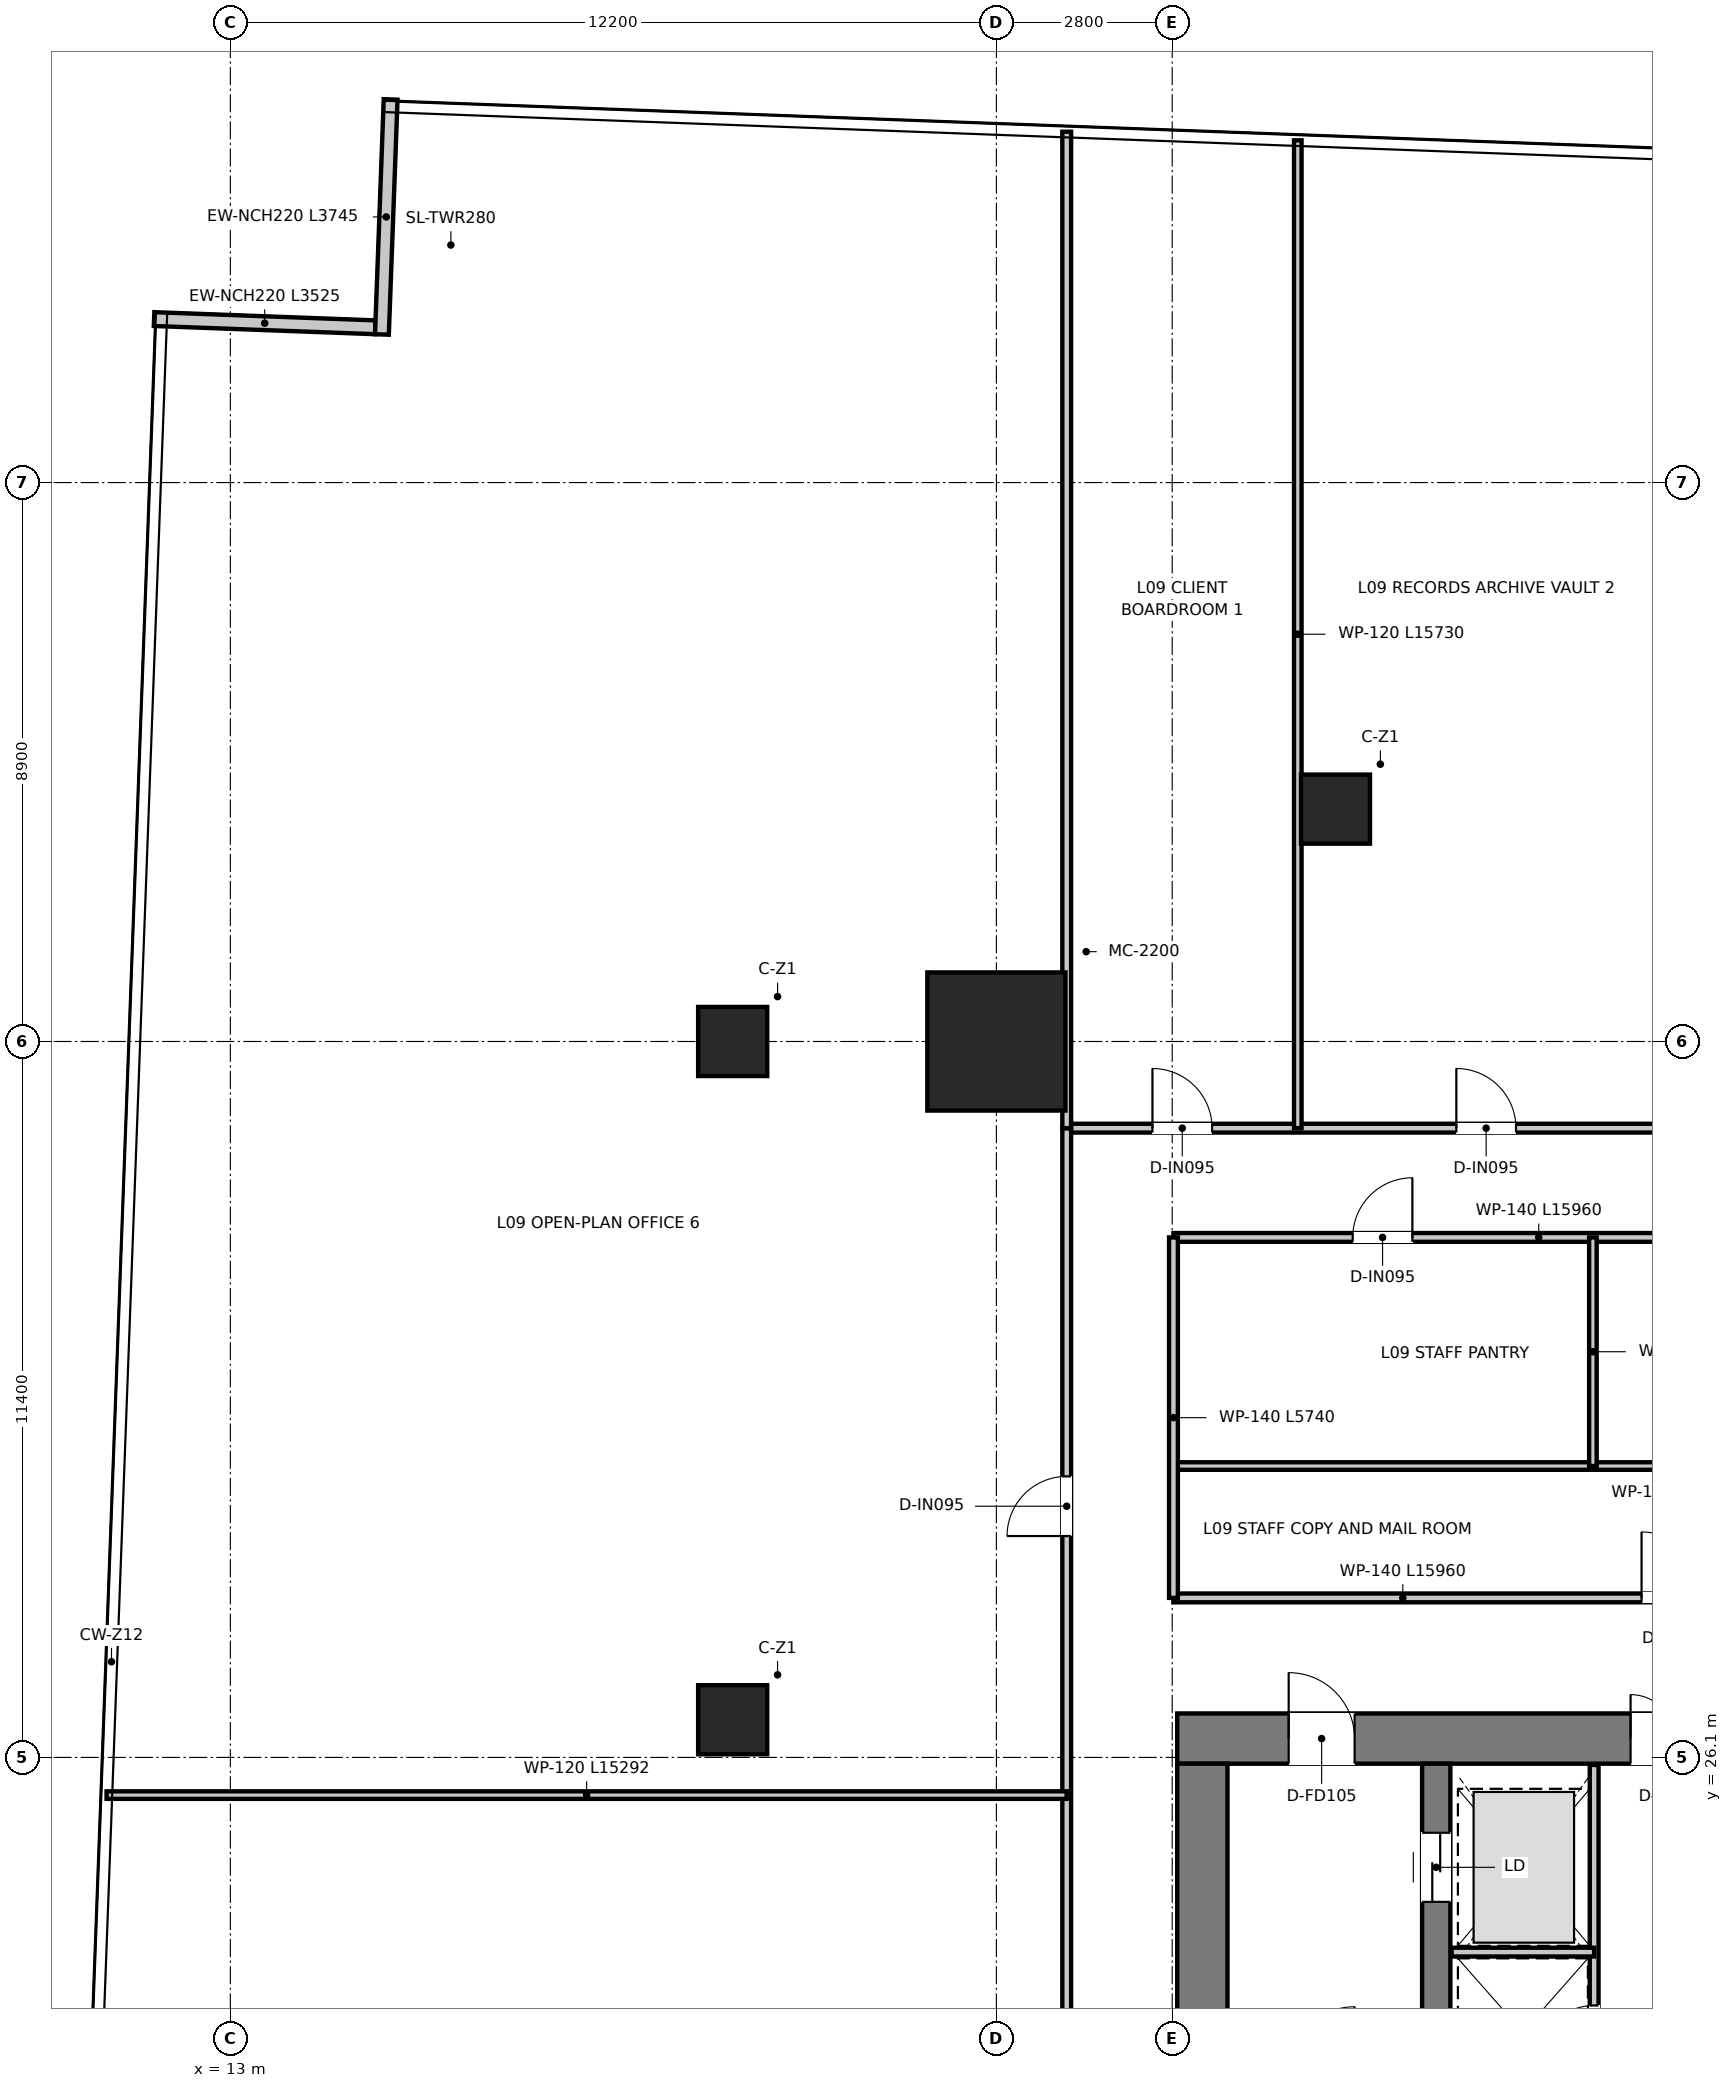
"""IFC4 building model, lengths in metres.
Left out: names, types, materials, properties, quantities, classifications, styles, units other than length and angle.
Written with IfcOpenShell. Run it as: python <this file> out.ifc"""

import sys

from ifc_helpers import new_model, si_unit, direction, frame, frame_2d, origin, origin_2d, place, context, subcontext, project, spatial, rectangle, extrude, source, transform, mapped, element, fill, save


model = new_model("IFC4")
c1 = context("Model", 3, precision=1e-05, world=origin(), true_north=direction((0.0, 1.0)))
c2 = subcontext(c1, "Body", "Model", "MODEL_VIEW")
j1 = project(units=[si_unit("LENGTHUNIT", "METRE"), si_unit("PLANEANGLEUNIT", "RADIAN")], contexts=[c1])
p1 = place(None, origin())
s1 = spatial("IfcSite", under=j1, at=p1, CompositionType="ELEMENT")
p2 = place(p1, origin())
s2 = spatial("IfcBuilding", under=s1, at=p2, CompositionType="ELEMENT")
p3 = place(p2, frame((0.0, 0.0, 40.8)))
s3 = spatial("IfcBuildingStorey", under=s2, at=p3, CompositionType="ELEMENT", Elevation=40.8)
p4 = place(p3, frame((28.08, 26.4, 0.0), z_axis=(0.0, 0.0, 1.0), x_axis=(1.0, 0.0, 0.0)))
e1 = element("IfcWall", 1, at=p4, inside=s3, PredefinedType="SHEAR", context=c2, shape_type="SweptSolid", body=[
    extrude(rectangle(XDim=15.84, YDim=0.8, at=frame_2d((7.92, 0.0))), origin(), (0.0, 0.0, 1.0), 3.95),
])
p5 = place(p4, frame((7.22, 0.0, 0.0)))
e2 = element("IfcOpeningElement", 2, at=p5, cuts=e1, PredefinedType="OPENING", context=c2, shape_type="SweptSolid", body=[
    extrude(rectangle(XDim=1.4, YDim=2.2, at=frame_2d((0.7, 1.1))), frame((0.0, 0.41, 0.0), z_axis=(0.0, -1.0, 0.0), x_axis=(1.0, 0.0, 0.0)), (0.0, 0.0, 1.0), 0.82),
])
p6 = place(p4, frame((1.775, 0.0, 0.0)))
e3 = element("IfcOpeningElement", 3, at=p6, cuts=e1, PredefinedType="OPENING", context=c2, shape_type="SweptSolid", body=[
    extrude(rectangle(XDim=1.05, YDim=2.1, at=frame_2d((0.525, 1.05))), frame((0.0, 0.41, 0.0), z_axis=(0.0, -1.0, 0.0), x_axis=(1.0, 0.0, 0.0)), (0.0, 0.0, 1.0), 0.82),
])
p7 = place(p4, frame((13.015, 0.0, 0.0)))
e4 = element("IfcOpeningElement", 4, at=p7, cuts=e1, PredefinedType="OPENING", context=c2, shape_type="SweptSolid", body=[
    extrude(rectangle(XDim=1.05, YDim=2.1, at=frame_2d((0.525, 1.05))), frame((0.0, 0.41, 0.0), z_axis=(0.0, -1.0, 0.0), x_axis=(1.0, 0.0, 0.0)), (0.0, 0.0, 1.0), 0.82),
])
p8 = place(p3, frame((28.48, 11.3, 0.0), z_axis=(0.0, 0.0, 1.0), x_axis=(0.0, 1.0, 0.0)))
e5 = element("IfcWall", 5, at=p8, inside=s3, PredefinedType="SHEAR", context=c2, shape_type="SweptSolid", body=[
    extrude(rectangle(XDim=14.7, YDim=0.8, at=frame_2d((7.35, 0.0))), origin(), (0.0, 0.0, 1.0), 3.95),
])
p9 = place(p3, frame((32.205, 13.22, 0.0), z_axis=(0.0, 0.0, 1.0), x_axis=(0.0, 1.0, 0.0)))
e6 = element("IfcWall", 6, at=p9, inside=s3, PredefinedType="SHEAR", context=c2, shape_type="SweptSolid", body=[
    extrude(rectangle(XDim=12.78, YDim=0.45, at=frame_2d((6.39, 0.0))), origin(), (0.0, 0.0, 1.0), 3.95),
])
p10 = place(p9, frame((10.58, 0.0, 0.0)))
e7 = element("IfcOpeningElement", 7, at=p10, cuts=e6, PredefinedType="OPENING", context=c2, shape_type="SweptSolid", body=[
    extrude(rectangle(XDim=1.1, YDim=2.15, at=frame_2d((0.55, 1.075))), frame((0.0, 0.235, 0.0), z_axis=(0.0, -1.0, 0.0), x_axis=(1.0, 0.0, 0.0)), (0.0, 0.0, 1.0), 0.47),
])
m1 = source(origin(), c2, "Body", "SweptSolid", [
    extrude(rectangle(XDim=2.2, YDim=2.2, at=origin_2d()), origin(), (0.0, 0.0, 1.0), 3.95),
])
p11 = place(p3, frame((25.2, 37.5, 0.0), z_axis=(0.0, 0.0, 1.0), x_axis=(1.0, 0.0, 0.0)))
e8 = element("IfcColumn", 8, at=p11, inside=s3, PredefinedType="USERDEFINED", context=c2, shape_type="MappedRepresentation", body=[
    mapped(m1, transform((0.0, 0.0, 0.0), x_axis=(1.0, 0.0, 0.0), y_axis=(0.0, 1.0, 0.0), z_axis=(0.0, 0.0, 1.0), scale=1.0)),
])
m2 = source(origin(), c2, "Body", "SweptSolid", [
    extrude(rectangle(XDim=1.1, YDim=1.1, at=origin_2d()), origin(), (0.0, 0.0, 1.0), 3.95),
])
for number, where, z_axis, x_axis in (
    (9, (21.0, 26.7, 0.0), (0.0, 0.0, 1.0), (1.0, 0.0, 0.0)),
    (10, (21.0, 37.5, 0.0), (0.0, 0.0, 1.0), (1.0, 0.0, 0.0)),
    (11, (30.6, 41.2, 0.0), (0.0, 0.0, 1.0), (1.0, 0.0, 0.0)),
):
    element("IfcColumn", number, at=place(p3, frame(where, z_axis=z_axis, x_axis=x_axis)), inside=s3, PredefinedType="COLUMN", context=c2, shape_type="MappedRepresentation", body=[
        mapped(m2, transform((0.0, 0.0, 0.0), x_axis=(1.0, 0.0, 0.0), y_axis=(0.0, 1.0, 0.0), z_axis=(0.0, 0.0, 1.0), scale=1.0)),
    ])
p12 = place(p3, frame((15.308, 48.873, 0.0), z_axis=(0.0, 0.0, 1.0), x_axis=(-0.999313219865, 0.03705521019, 0.0)))
e12 = element("IfcWall", 12, at=p12, inside=s3, PredefinedType="ELEMENTEDWALL", context=c2, shape_type="SweptSolid", body=[
    extrude(rectangle(XDim=3.525, YDim=0.22, at=frame_2d((1.762, 0.0))), origin(), (0.0, 0.0, 1.0), 3.67),
])
p13 = place(p3, frame((15.553, 52.501, 0.0), z_axis=(0.0, 0.0, 1.0), x_axis=(-0.037093640215, -0.999311794114, 0.0)))
e13 = element("IfcWall", 13, at=p13, inside=s3, PredefinedType="ELEMENTEDWALL", context=c2, shape_type="SweptSolid", body=[
    extrude(rectangle(XDim=3.745, YDim=0.22, at=frame_2d((1.873, 0.0))), origin(), (0.0, 0.0, 1.0), 3.67),
])
p14 = place(p3, frame((34.72, 20.2, 0.0), z_axis=(0.0, 0.0, 1.0), x_axis=(0.0, 1.0, 0.0)))
e14 = element("IfcWall", 14, at=p14, inside=s3, PredefinedType="PARTITIONING", context=c2, shape_type="SweptSolid", body=[
    extrude(rectangle(XDim=5.78, YDim=0.14, at=frame_2d((2.89, 0.0))), origin(), (0.0, 0.0, 1.0), 2.47),
])
p15 = place(p14, frame((1.05, 0.0, 0.0)))
e15 = element("IfcOpeningElement", 15, at=p15, cuts=e14, PredefinedType="OPENING", context=c2, shape_type="SweptSolid", body=[
    extrude(rectangle(XDim=0.9, YDim=2.1, at=frame_2d((0.45, 1.05))), frame((0.0, 0.08, 0.0), z_axis=(0.0, -1.0, 0.0), x_axis=(1.0, 0.0, 0.0)), (0.0, 0.0, 1.0), 0.16),
])
p16 = place(p3, frame((32.45, 23.0, 0.0), z_axis=(0.0, 0.0, 1.0), x_axis=(1.0, 0.0, 0.0)))
e16 = element("IfcWall", 16, at=p16, inside=s3, PredefinedType="PARTITIONING", context=c2, shape_type="SweptSolid", body=[
    extrude(rectangle(XDim=2.27, YDim=0.14, at=frame_2d((1.135, 0.0))), origin(), (0.0, 0.0, 1.0), 2.47),
])
p17 = place(p3, frame((28.02, 28.64, 0.0), z_axis=(0.0, 0.0, 1.0), x_axis=(1.0, 0.0, 0.0)))
e17 = element("IfcWall", 17, at=p17, inside=s3, PredefinedType="PARTITIONING", context=c2, shape_type="SweptSolid", body=[
    extrude(rectangle(XDim=15.96, YDim=0.14, at=frame_2d((7.98, 0.0))), origin(), (0.0, 0.0, 1.0), 3.08),
])
p18 = place(p17, frame((7.455, 0.0, 0.0)))
e18 = element("IfcOpeningElement", 18, at=p18, cuts=e17, PredefinedType="OPENING", context=c2, shape_type="SweptSolid", body=[
    extrude(rectangle(XDim=1.05, YDim=2.15, at=frame_2d((0.525, 1.075))), frame((0.0, 0.08, 0.0), z_axis=(0.0, -1.0, 0.0), x_axis=(1.0, 0.0, 0.0)), (0.0, 0.0, 1.0), 0.16),
])
p19 = place(p3, frame((28.02, 30.74, 0.0), z_axis=(0.0, 0.0, 1.0), x_axis=(1.0, 0.0, 0.0)))
e19 = element("IfcWall", 19, at=p19, inside=s3, PredefinedType="PARTITIONING", context=c2, shape_type="SweptSolid", body=[
    extrude(rectangle(XDim=15.96, YDim=0.12, at=frame_2d((7.98, 0.0))), origin(), (0.0, 0.0, 1.0), 3.08),
])
p20 = place(p3, frame((28.02, 34.38, 0.0), z_axis=(0.0, 0.0, 1.0), x_axis=(1.0, 0.0, 0.0)))
e20 = element("IfcWall", 20, at=p20, inside=s3, PredefinedType="PARTITIONING", context=c2, shape_type="SweptSolid", body=[
    extrude(rectangle(XDim=15.96, YDim=0.14, at=frame_2d((7.98, 0.0))), origin(), (0.0, 0.0, 1.0), 3.08),
])
p21 = place(p20, frame((7.83, 0.0, 0.0)))
e21 = element("IfcOpeningElement", 21, at=p21, cuts=e20, PredefinedType="OPENING", context=c2, shape_type="SweptSolid", body=[
    extrude(rectangle(XDim=0.9, YDim=2.1, at=frame_2d((0.45, 1.05))), frame((0.0, 0.08, 0.0), z_axis=(0.0, -1.0, 0.0), x_axis=(1.0, 0.0, 0.0)), (0.0, 0.0, 1.0), 0.16),
])
p22 = place(p20, frame((11.03, 0.0, 0.0)))
e22 = element("IfcOpeningElement", 22, at=p22, cuts=e20, PredefinedType="OPENING", context=c2, shape_type="SweptSolid", body=[
    extrude(rectangle(XDim=0.9, YDim=2.1, at=frame_2d((0.45, 1.05))), frame((0.0, 0.08, 0.0), z_axis=(0.0, -1.0, 0.0), x_axis=(1.0, 0.0, 0.0)), (0.0, 0.0, 1.0), 0.16),
])
p23 = place(p20, frame((14.055, 0.0, 0.0)))
e23 = element("IfcOpeningElement", 23, at=p23, cuts=e20, PredefinedType="OPENING", context=c2, shape_type="SweptSolid", body=[
    extrude(rectangle(XDim=0.95, YDim=2.1, at=frame_2d((0.475, 1.05))), frame((0.0, 0.08, 0.0), z_axis=(0.0, -1.0, 0.0), x_axis=(1.0, 0.0, 0.0)), (0.0, 0.0, 1.0), 0.16),
])
p24 = place(p20, frame((2.855, 0.0, 0.0)))
e24 = element("IfcOpeningElement", 24, at=p24, cuts=e20, PredefinedType="OPENING", context=c2, shape_type="SweptSolid", body=[
    extrude(rectangle(XDim=0.95, YDim=2.1, at=frame_2d((0.475, 1.05))), frame((0.0, 0.08, 0.0), z_axis=(0.0, -1.0, 0.0), x_axis=(1.0, 0.0, 0.0)), (0.0, 0.0, 1.0), 0.16),
])
p25 = place(p3, frame((28.02, 28.64, 0.0), z_axis=(0.0, 0.0, 1.0), x_axis=(0.0, 1.0, 0.0)))
e25 = element("IfcWall", 25, at=p25, inside=s3, PredefinedType="PARTITIONING", context=c2, shape_type="SweptSolid", body=[
    extrude(rectangle(XDim=5.74, YDim=0.14, at=frame_2d((2.87, 0.0))), origin(), (0.0, 0.0, 1.0), 3.22),
])
p26 = place(p3, frame((34.7, 30.74, 0.0), z_axis=(0.0, 0.0, 1.0), x_axis=(0.0, 1.0, 0.0)))
e26 = element("IfcWall", 26, at=p26, inside=s3, PredefinedType="PARTITIONING", context=c2, shape_type="SweptSolid", body=[
    extrude(rectangle(XDim=3.64, YDim=0.12, at=frame_2d((1.82, 0.0))), origin(), (0.0, 0.0, 1.0), 3.12),
])
p27 = place(p3, frame((26.32, 36.12, 0.0), z_axis=(0.0, 0.0, 1.0), x_axis=(1.0, 0.0, 0.0)))
e27 = element("IfcWall", 27, at=p27, inside=s3, PredefinedType="PARTITIONING", context=c2, shape_type="SweptSolid", body=[
    extrude(rectangle(XDim=19.36, YDim=0.14, at=frame_2d((9.68, 0.0))), origin(), (0.0, 0.0, 1.0), 3.08),
])
p28 = place(p27, frame((1.365, 0.0, 0.0)))
e28 = element("IfcOpeningElement", 28, at=p28, cuts=e27, PredefinedType="OPENING", context=c2, shape_type="SweptSolid", body=[
    extrude(rectangle(XDim=0.95, YDim=2.1, at=frame_2d((0.475, 1.05))), frame((0.0, 0.08, 0.0), z_axis=(0.0, -1.0, 0.0), x_axis=(1.0, 0.0, 0.0)), (0.0, 0.0, 1.0), 0.16),
])
p29 = place(p27, frame((6.205, 0.0, 0.0)))
e29 = element("IfcOpeningElement", 29, at=p29, cuts=e27, PredefinedType="OPENING", context=c2, shape_type="SweptSolid", body=[
    extrude(rectangle(XDim=0.95, YDim=2.1, at=frame_2d((0.475, 1.05))), frame((0.0, 0.08, 0.0), z_axis=(0.0, -1.0, 0.0), x_axis=(1.0, 0.0, 0.0)), (0.0, 0.0, 1.0), 0.16),
])
p30 = place(p27, frame((12.205, 0.0, 0.0)))
e30 = element("IfcOpeningElement", 30, at=p30, cuts=e27, PredefinedType="OPENING", context=c2, shape_type="SweptSolid", body=[
    extrude(rectangle(XDim=0.95, YDim=2.1, at=frame_2d((0.475, 1.05))), frame((0.0, 0.08, 0.0), z_axis=(0.0, -1.0, 0.0), x_axis=(1.0, 0.0, 0.0)), (0.0, 0.0, 1.0), 0.16),
])
p31 = place(p27, frame((17.045, 0.0, 0.0)))
e31 = element("IfcOpeningElement", 31, at=p31, cuts=e27, PredefinedType="OPENING", context=c2, shape_type="SweptSolid", body=[
    extrude(rectangle(XDim=0.95, YDim=2.1, at=frame_2d((0.475, 1.05))), frame((0.0, 0.08, 0.0), z_axis=(0.0, -1.0, 0.0), x_axis=(1.0, 0.0, 0.0)), (0.0, 0.0, 1.0), 0.16),
])
p32 = place(p3, frame((26.32, 10.5, 0.0), z_axis=(0.0, 0.0, 1.0), x_axis=(0.0, 1.0, 0.0)))
e32 = element("IfcWall", 32, at=p32, inside=s3, PredefinedType="PARTITIONING", context=c2, shape_type="SweptSolid", body=[
    extrude(rectangle(XDim=25.62, YDim=0.14, at=frame_2d((12.81, 0.0))), origin(), (0.0, 0.0, 1.0), 2.97),
])
p33 = place(p32, frame((10.525, 0.0, 0.0)))
e33 = element("IfcOpeningElement", 33, at=p33, cuts=e32, PredefinedType="OPENING", context=c2, shape_type="SweptSolid", body=[
    extrude(rectangle(XDim=0.95, YDim=2.1, at=frame_2d((0.475, 1.05))), frame((0.0, 0.08, 0.0), z_axis=(0.0, -1.0, 0.0), x_axis=(1.0, 0.0, 0.0)), (0.0, 0.0, 1.0), 0.16),
])
p34 = place(p32, frame((19.125, 0.0, 0.0)))
e34 = element("IfcOpeningElement", 34, at=p34, cuts=e32, PredefinedType="OPENING", context=c2, shape_type="SweptSolid", body=[
    extrude(rectangle(XDim=0.95, YDim=2.1, at=frame_2d((0.475, 1.05))), frame((0.0, 0.08, 0.0), z_axis=(0.0, -1.0, 0.0), x_axis=(1.0, 0.0, 0.0)), (0.0, 0.0, 1.0), 0.16),
])
p35 = place(p3, frame((26.32, 36.12, 0.0), z_axis=(0.0, 0.0, 1.0), x_axis=(0.0, 1.0, 0.0)))
e35 = element("IfcWall", 35, at=p35, inside=s3, PredefinedType="PARTITIONING", context=c2, shape_type="SweptSolid", body=[
    extrude(rectangle(XDim=15.866, YDim=0.14, at=frame_2d((7.933, 0.0))), origin(), (0.0, 0.0, 1.0), 2.97),
])
p36 = place(p3, frame((30.0, 36.12, 0.0), z_axis=(0.0, 0.0, 1.0), x_axis=(0.0, 1.0, 0.0)))
e36 = element("IfcWall", 36, at=p36, inside=s3, PredefinedType="PARTITIONING", context=c2, shape_type="SweptSolid", body=[
    extrude(rectangle(XDim=15.73, YDim=0.12, at=frame_2d((7.865, 0.0))), origin(), (0.0, 0.0, 1.0), 2.97),
])
p37 = place(p3, frame((11.028, 25.5, 0.0), z_axis=(0.0, 0.0, 1.0), x_axis=(1.0, 0.0, 0.0)))
e37 = element("IfcWall", 37, at=p37, inside=s3, PredefinedType="PARTITIONING", context=c2, shape_type="SweptSolid", body=[
    extrude(rectangle(XDim=15.292, YDim=0.12, at=frame_2d((7.646, 0.0))), origin(), (0.0, 0.0, 1.0), 2.97),
])
p38 = place(p5, origin())
e38 = element("IfcDoor", 38, at=p38, inside=s3, OperationType="DOUBLE_DOOR_SINGLE_SWING", PredefinedType="DOOR", context=c2, shape_type="SweptSolid", body=[
    extrude(rectangle(XDim=1.4, YDim=2.2, at=frame_2d((0.7, 1.1))), frame((0.0, 0.025, 0.0), z_axis=(0.0, -1.0, 0.0), x_axis=(1.0, 0.0, 0.0)), (0.0, 0.0, 1.0), 0.05),
])
fill(e2, e38)
p39 = place(p6, origin())
e39 = element("IfcDoor", 39, at=p39, inside=s3, OperationType="SINGLE_SWING_LEFT", PredefinedType="DOOR", context=c2, shape_type="SweptSolid", body=[
    extrude(rectangle(XDim=1.05, YDim=2.1, at=frame_2d((0.525, 1.05))), frame((0.0, 0.025, 0.0), z_axis=(0.0, -1.0, 0.0), x_axis=(1.0, 0.0, 0.0)), (0.0, 0.0, 1.0), 0.05),
])
fill(e3, e39)
p40 = place(p10, origin())
e40 = element("IfcDoor", 40, at=p40, inside=s3, OperationType="DOUBLE_DOOR_SLIDING", PredefinedType="DOOR", context=c2, shape_type="SweptSolid", body=[
    extrude(rectangle(XDim=1.1, YDim=2.15, at=frame_2d((0.55, 1.075))), frame((0.0, 0.025, 0.0), z_axis=(0.0, -1.0, 0.0), x_axis=(1.0, 0.0, 0.0)), (0.0, 0.0, 1.0), 0.05),
])
fill(e7, e40)
p41 = place(p15, origin())
e41 = element("IfcDoor", 41, at=p41, inside=s3, OperationType="SINGLE_SWING_LEFT", PredefinedType="DOOR", context=c2, shape_type="SweptSolid", body=[
    extrude(rectangle(XDim=0.9, YDim=2.1, at=frame_2d((0.45, 1.05))), frame((0.0, 0.025, 0.0), z_axis=(0.0, -1.0, 0.0), x_axis=(1.0, 0.0, 0.0)), (0.0, 0.0, 1.0), 0.05),
])
fill(e15, e41)
p42 = place(p18, origin())
e42 = element("IfcDoor", 42, at=p42, inside=s3, OperationType="SINGLE_SWING_LEFT", PredefinedType="DOOR", context=c2, shape_type="SweptSolid", body=[
    extrude(rectangle(XDim=1.05, YDim=2.15, at=frame_2d((0.525, 1.075))), frame((0.0, 0.025, 0.0), z_axis=(0.0, -1.0, 0.0), x_axis=(1.0, 0.0, 0.0)), (0.0, 0.0, 1.0), 0.05),
])
fill(e18, e42)
p43 = place(p24, origin())
e43 = element("IfcDoor", 43, at=p43, inside=s3, OperationType="SINGLE_SWING_RIGHT", PredefinedType="DOOR", context=c2, shape_type="SweptSolid", body=[
    extrude(rectangle(XDim=0.95, YDim=2.1, at=frame_2d((0.475, 1.05))), frame((0.0, 0.025, 0.0), z_axis=(0.0, -1.0, 0.0), x_axis=(1.0, 0.0, 0.0)), (0.0, 0.0, 1.0), 0.05),
])
fill(e24, e43)
p44 = place(p28, origin())
e44 = element("IfcDoor", 44, at=p44, inside=s3, OperationType="SINGLE_SWING_LEFT", PredefinedType="DOOR", context=c2, shape_type="SweptSolid", body=[
    extrude(rectangle(XDim=0.95, YDim=2.1, at=frame_2d((0.475, 1.05))), frame((0.0, 0.025, 0.0), z_axis=(0.0, -1.0, 0.0), x_axis=(1.0, 0.0, 0.0)), (0.0, 0.0, 1.0), 0.05),
])
fill(e28, e44)
p45 = place(p29, origin())
e45 = element("IfcDoor", 45, at=p45, inside=s3, OperationType="SINGLE_SWING_LEFT", PredefinedType="DOOR", context=c2, shape_type="SweptSolid", body=[
    extrude(rectangle(XDim=0.95, YDim=2.1, at=frame_2d((0.475, 1.05))), frame((0.0, 0.025, 0.0), z_axis=(0.0, -1.0, 0.0), x_axis=(1.0, 0.0, 0.0)), (0.0, 0.0, 1.0), 0.05),
])
fill(e29, e45)
p46 = place(p34, origin())
e46 = element("IfcDoor", 46, at=p46, inside=s3, OperationType="SINGLE_SWING_LEFT", PredefinedType="DOOR", context=c2, shape_type="SweptSolid", body=[
    extrude(rectangle(XDim=0.95, YDim=2.1, at=frame_2d((0.475, 1.05))), frame((0.0, 0.025, 0.0), z_axis=(0.0, -1.0, 0.0), x_axis=(1.0, 0.0, 0.0)), (0.0, 0.0, 1.0), 0.05),
])
fill(e34, e46)
save(model, sys.argv[1])
